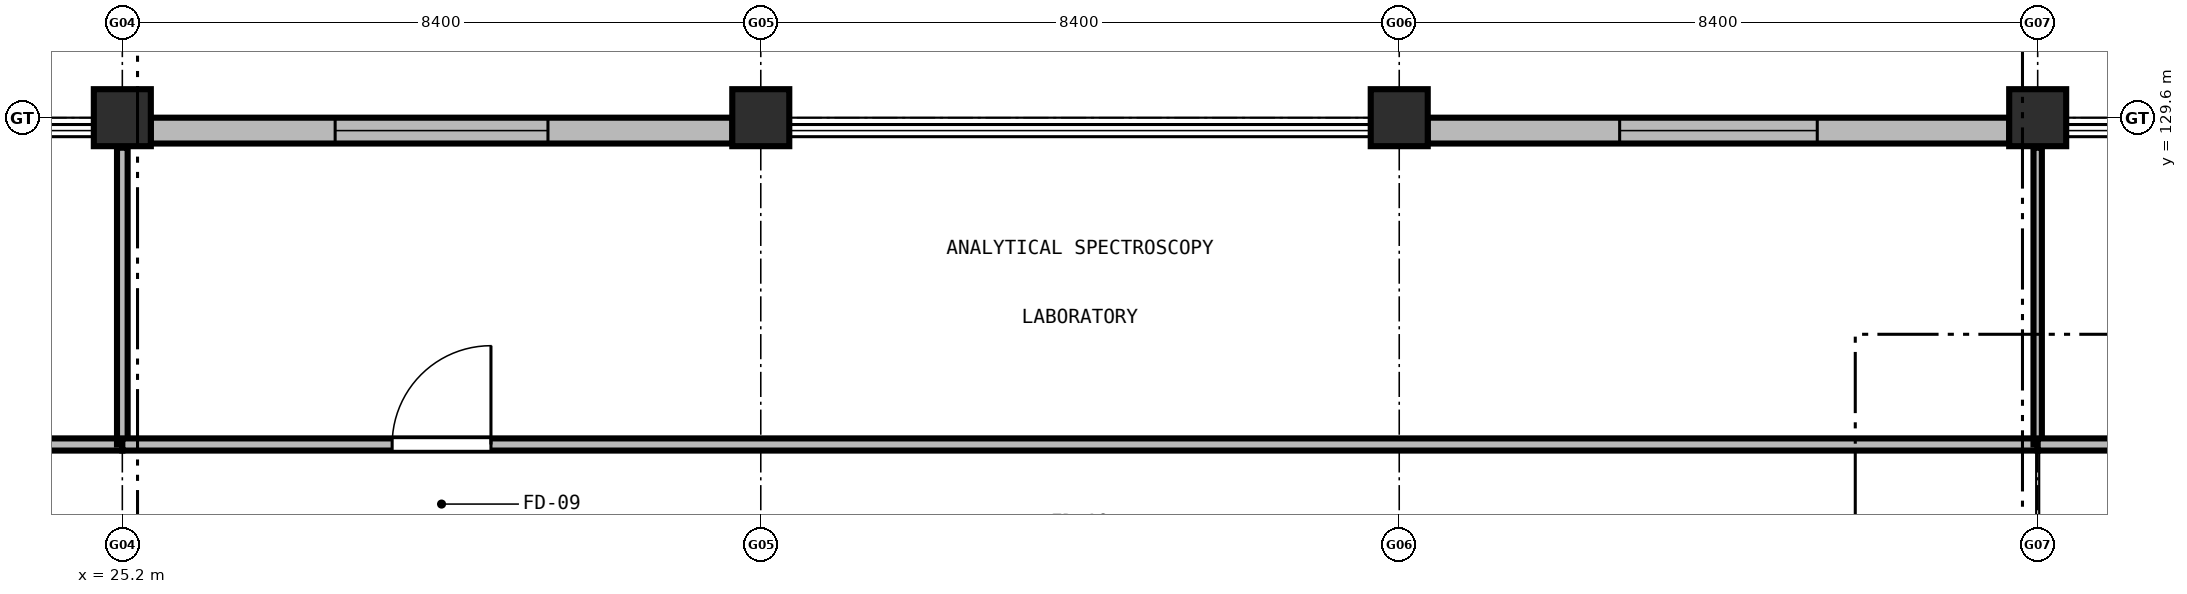
"""IFC4 building model, lengths in metres.
Left out: names, types, materials, properties, quantities, classifications, styles, units other than length and angle.
Written with IfcOpenShell. Run it as: python <this file> out.ifc"""

import sys

from ifc_helpers import new_model, si_unit, direction, frame, frame_2d, origin, origin_2d, place, context, subcontext, project, spatial, rectangle, extrude, element, fill, save


model = new_model("IFC4")
c1 = context("Model", 3, precision=1e-05, world=origin(), true_north=direction((0.0, 1.0)))
c2 = subcontext(c1, "Body", "Model", "MODEL_VIEW")
j1 = project(units=[si_unit("LENGTHUNIT", "METRE"), si_unit("PLANEANGLEUNIT", "RADIAN")], contexts=[c1])
p1 = place(None, origin())
s1 = spatial("IfcSite", under=j1, at=p1, CompositionType="ELEMENT")
p2 = place(p1, origin())
s2 = spatial("IfcBuilding", under=s1, at=p2, CompositionType="ELEMENT")
p3 = place(p2, frame((0.0, 0.0, 5.1)))
s3 = spatial("IfcBuildingStorey", under=s2, at=p3, CompositionType="ELEMENT", Elevation=5.1)
for number, where, z_axis, x_axis in (
    (1, (25.2, 129.6, 0.0), (0.0, 0.0, 1.0), (1.0, 0.0, 0.0)),
    (2, (33.6, 129.6, 0.0), (0.0, 0.0, 1.0), (1.0, 0.0, 0.0)),
    (3, (42.0, 129.6, 0.0), (0.0, 0.0, 1.0), (1.0, 0.0, 0.0)),
    (4, (50.4, 129.6, 0.0), (0.0, 0.0, 1.0), (1.0, 0.0, 0.0)),
):
    element("IfcColumn", number, at=place(p3, frame(where, z_axis=z_axis, x_axis=x_axis)), inside=s3, PredefinedType="COLUMN", context=c2, shape_type="SweptSolid", body=[
        extrude(rectangle(XDim=0.75, YDim=0.75, at=origin_2d()), origin(), (0.0, 0.0, 1.0), 4.2),
    ])
p4 = place(p3, frame((25.573, 129.43, 0.0), z_axis=(0.0, 0.0, 1.0), x_axis=(1.0, 0.0, 0.0)))
e5 = element("IfcWall", 5, at=p4, inside=s3, PredefinedType="SOLIDWALL", context=c2, shape_type="SweptSolid", body=[
    extrude(rectangle(XDim=7.654, YDim=0.34, at=frame_2d((3.827, 0.0))), origin(), (0.0, 0.0, 1.0), 3.11),
])
p5 = place(p4, frame((2.427, 0.0, 0.95)))
e6 = element("IfcOpeningElement", 6, at=p5, cuts=e5, PredefinedType="OPENING", context=c2, shape_type="SweptSolid", body=[
    extrude(rectangle(XDim=2.8, YDim=1.91, at=frame_2d((1.4, 0.955))), frame((0.0, 0.18, 0.0), z_axis=(0.0, -1.0, 0.0), x_axis=(1.0, 0.0, 0.0)), (0.0, 0.0, 1.0), 0.36),
])
p6 = place(p3, frame((42.373, 129.43, 0.0), z_axis=(0.0, 0.0, 1.0), x_axis=(1.0, 0.0, 0.0)))
e7 = element("IfcWall", 7, at=p6, inside=s3, PredefinedType="SOLIDWALL", context=c2, shape_type="SweptSolid", body=[
    extrude(rectangle(XDim=7.654, YDim=0.34, at=frame_2d((3.827, 0.0))), origin(), (0.0, 0.0, 1.0), 3.11),
])
p7 = place(p6, frame((2.527, 0.0, 0.95)))
e8 = element("IfcOpeningElement", 8, at=p7, cuts=e7, PredefinedType="OPENING", context=c2, shape_type="SweptSolid", body=[
    extrude(rectangle(XDim=2.6, YDim=1.8, at=frame_2d((1.3, 0.9))), frame((0.0, 0.18, 0.0), z_axis=(0.0, -1.0, 0.0), x_axis=(1.0, 0.0, 0.0)), (0.0, 0.0, 1.0), 0.36),
])
p8 = place(p3, frame((22.47, 125.3, 0.0), z_axis=(0.0, 0.0, 1.0), x_axis=(1.0, 0.0, 0.0)))
e9 = element("IfcWall", 9, at=p8, inside=s3, PredefinedType="PARTITIONING", context=c2, shape_type="SweptSolid", body=[
    extrude(rectangle(XDim=2.73, YDim=0.16, at=frame_2d((1.365, 0.0))), origin(), (0.0, 0.0, 1.0), 3.305),
])
p9 = place(p3, frame((25.2, 125.3, 0.0), z_axis=(0.0, 0.0, 1.0), x_axis=(0.0, 1.0, 0.0)))
e10 = element("IfcWall", 10, at=p9, inside=s3, PredefinedType="PARTITIONING", context=c2, shape_type="SweptSolid", body=[
    extrude(rectangle(XDim=3.905, YDim=0.14, at=frame_2d((1.953, 0.0))), origin(), (0.0, 0.0, 1.0), 3.105),
])
p10 = place(p3, frame((25.2, 125.3, 0.0), z_axis=(0.0, 0.0, 1.0), x_axis=(1.0, 0.0, 0.0)))
e11 = element("IfcWall", 11, at=p10, inside=s3, PredefinedType="PARTITIONING", context=c2, shape_type="SweptSolid", body=[
    extrude(rectangle(XDim=25.2, YDim=0.16, at=frame_2d((12.6, 0.0))), origin(), (0.0, 0.0, 1.0), 3.305),
])
p11 = place(p10, frame((3.55, 0.0, 0.0)))
e12 = element("IfcOpeningElement", 12, at=p11, cuts=e11, PredefinedType="OPENING", context=c2, shape_type="SweptSolid", body=[
    extrude(rectangle(XDim=1.3, YDim=2.15, at=frame_2d((0.65, 1.075))), frame((0.0, 0.09, 0.0), z_axis=(0.0, -1.0, 0.0), x_axis=(1.0, 0.0, 0.0)), (0.0, 0.0, 1.0), 0.18),
])
p12 = place(p3, frame((50.4, 125.3, 0.0), z_axis=(0.0, 0.0, 1.0), x_axis=(0.0, 1.0, 0.0)))
e13 = element("IfcWall", 13, at=p12, inside=s3, PredefinedType="PARTITIONING", context=c2, shape_type="SweptSolid", body=[
    extrude(rectangle(XDim=3.905, YDim=0.11, at=frame_2d((1.953, 0.0))), origin(), (0.0, 0.0, 1.0), 3.105),
])
p13 = place(p3, frame((50.4, 125.3, 0.0), z_axis=(0.0, 0.0, 1.0), x_axis=(1.0, 0.0, 0.0)))
e14 = element("IfcWall", 14, at=p13, inside=s3, PredefinedType="PARTITIONING", context=c2, shape_type="SweptSolid", body=[
    extrude(rectangle(XDim=2.73, YDim=0.16, at=frame_2d((1.365, 0.0))), origin(), (0.0, 0.0, 1.0), 3.305),
])
p14 = place(p13, frame((1.23, 0.0, 0.0)))
e15 = element("IfcOpeningElement", 15, at=p14, cuts=e14, PredefinedType="OPENING", context=c2, shape_type="SweptSolid", body=[
    extrude(rectangle(XDim=1.05, YDim=2.15, at=frame_2d((0.525, 1.075))), frame((0.0, 0.09, 0.0), z_axis=(0.0, -1.0, 0.0), x_axis=(1.0, 0.0, 0.0)), (0.0, 0.0, 1.0), 0.18),
])
p15 = place(p5, origin())
e16 = element("IfcWindow", 16, at=p15, inside=s3, PartitioningType="SINGLE_PANEL", PredefinedType="WINDOW", context=c2, shape_type="SweptSolid", body=[
    extrude(rectangle(XDim=2.8, YDim=1.91, at=frame_2d((1.4, 0.955))), frame((0.0, 0.03, 0.0), z_axis=(0.0, -1.0, 0.0), x_axis=(1.0, 0.0, 0.0)), (0.0, 0.0, 1.0), 0.06),
])
fill(e6, e16)
p16 = place(p7, origin())
e17 = element("IfcWindow", 17, at=p16, inside=s3, PartitioningType="SINGLE_PANEL", PredefinedType="WINDOW", context=c2, shape_type="SweptSolid", body=[
    extrude(rectangle(XDim=2.6, YDim=1.8, at=frame_2d((1.3, 0.9))), frame((0.0, 0.03, 0.0), z_axis=(0.0, -1.0, 0.0), x_axis=(1.0, 0.0, 0.0)), (0.0, 0.0, 1.0), 0.06),
])
fill(e8, e17)
p17 = place(p11, origin())
e18 = element("IfcDoor", 18, at=p17, inside=s3, OperationType="SINGLE_SWING_RIGHT", PredefinedType="DOOR", context=c2, shape_type="SweptSolid", body=[
    extrude(rectangle(XDim=1.3, YDim=2.15, at=frame_2d((0.65, 1.075))), frame((0.0, 0.025, 0.0), z_axis=(0.0, -1.0, 0.0), x_axis=(1.0, 0.0, 0.0)), (0.0, 0.0, 1.0), 0.05),
])
fill(e12, e18)
save(model, sys.argv[1])
